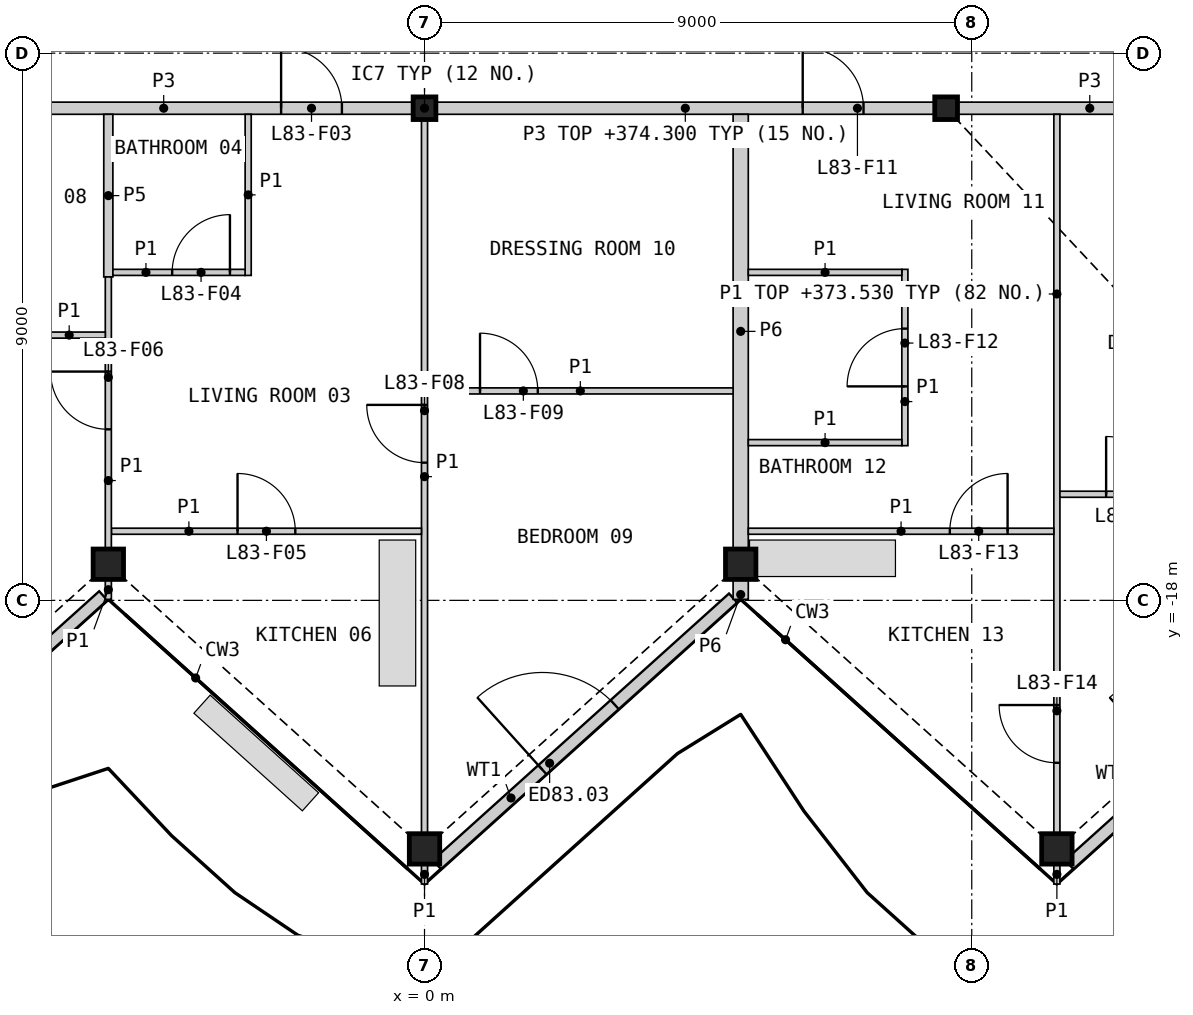
"""IFC4 building model, lengths in metres.
Left out: names, types, materials, properties, quantities, classifications, styles, units other than length and angle.
Written with IfcOpenShell. Run it as: python <this file> out.ifc"""

import sys

from ifc_helpers import new_model, si_unit, direction, frame, frame_2d, origin, origin_2d, place, context, subcontext, project, spatial, rectangle, hollow_rectangle, i_section, extrude, element, fill, save


model = new_model("IFC4")
c1 = context("Model", 3, precision=1e-05, world=origin(), true_north=direction((0.0, 1.0)))
c2 = subcontext(c1, "Body", "Model", "MODEL_VIEW")
j1 = project(units=[si_unit("LENGTHUNIT", "METRE"), si_unit("PLANEANGLEUNIT", "RADIAN")], contexts=[c1])
p1 = place(None, origin())
s1 = spatial("IfcSite", under=j1, at=p1, CompositionType="ELEMENT")
p2 = place(p1, origin())
s2 = spatial("IfcBuilding", under=s1, at=p2, CompositionType="ELEMENT")
p3 = place(p2, frame((0.0, 0.0, 371.2)))
s3 = spatial("IfcBuildingStorey", under=s2, at=p3, CompositionType="ELEMENT", Elevation=371.2)
for number, where, z_axis, x_axis in (
    (1, (-5.2, -17.406, 0.0), (0.0, 0.0, 1.0), (1.0, 0.0, 0.0)),
    (2, (0.0, -22.088, 0.0), (0.0, 0.0, 1.0), (1.0, 0.0, 0.0)),
    (3, (5.2, -17.406, 0.0), (0.0, 0.0, 1.0), (1.0, 0.0, 0.0)),
    (4, (10.4, -22.088, 0.0), (0.0, 0.0, 1.0), (1.0, 0.0, 0.0)),
):
    element("IfcColumn", number, at=place(p3, frame(where, z_axis=z_axis, x_axis=x_axis)), inside=s3, PredefinedType="COLUMN", context=c2, shape_type="SweptSolid", body=[
        extrude(hollow_rectangle(XDim=0.5, YDim=0.5, WallThickness=0.03, at=origin_2d()), origin(), (0.0, 0.0, 1.0), 3.4),
    ])
for number, where, z_axis, x_axis in (
    (5, (0.0, -9.906, 0.0), (0.0, 0.0, 1.0), (1.0, 0.0, 0.0)),
    (6, (8.578, -9.906, 0.0), (0.0, 0.0, 1.0), (1.0, 0.0, 0.0)),
):
    element("IfcColumn", number, at=place(p3, frame(where, z_axis=z_axis, x_axis=x_axis)), inside=s3, PredefinedType="COLUMN", context=c2, shape_type="SweptSolid", body=[
        extrude(i_section(OverallWidth=0.374, OverallDepth=0.372, WebThickness=0.016, FlangeThickness=0.026, at=origin_2d()), origin(), (0.0, 0.0, 1.0), 3.4),
    ])
p4 = place(p3, frame((-10.195, -22.346, 0.0), z_axis=(0.0, 0.0, 1.0), x_axis=(0.74313432117, 0.66914227239, 0.0)))
e7 = element("IfcWall", 7, at=p4, inside=s3, PredefinedType="SOLIDWALL", context=c2, shape_type="SweptSolid", body=[
    extrude(rectangle(XDim=6.609, YDim=0.2, at=frame_2d((3.304, 0.0))), origin(), (0.0, 0.0, 1.0), 2.634),
])
p5 = place(p4, frame((2.333, 0.0, 0.0)))
e8 = element("IfcOpeningElement", 8, at=p5, cuts=e7, PredefinedType="OPENING", context=c2, shape_type="SweptSolid", body=[
    extrude(rectangle(XDim=1.6, YDim=2.25, at=frame_2d((0.8, 1.125))), frame((0.0, 0.11, 0.0), z_axis=(0.0, -1.0, 0.0), x_axis=(1.0, 0.0, 0.0)), (0.0, 0.0, 1.0), 0.22),
])
p6 = place(p3, frame((0.205, -22.346, 0.0), z_axis=(0.0, 0.0, 1.0), x_axis=(0.74313295916, 0.669143785004, 0.0)))
e9 = element("IfcWall", 9, at=p6, inside=s3, PredefinedType="SOLIDWALL", context=c2, shape_type="SweptSolid", body=[
    extrude(rectangle(XDim=6.553, YDim=0.2, at=frame_2d((3.277, 0.0))), origin(), (0.0, 0.0, 1.0), 2.634),
])
p7 = place(p6, frame((2.333, 0.0, 0.0)))
e10 = element("IfcOpeningElement", 10, at=p7, cuts=e9, PredefinedType="OPENING", context=c2, shape_type="SweptSolid", body=[
    extrude(rectangle(XDim=1.6, YDim=2.25, at=frame_2d((0.8, 1.125))), frame((0.0, 0.11, 0.0), z_axis=(0.0, -1.0, 0.0), x_axis=(1.0, 0.0, 0.0)), (0.0, 0.0, 1.0), 0.22),
])
p8 = place(p3, frame((10.605, -22.346, 0.0), z_axis=(0.0, 0.0, 1.0), x_axis=(0.743137181878, 0.669139095339, 0.0)))
e11 = element("IfcWall", 11, at=p8, inside=s3, PredefinedType="SOLIDWALL", context=c2, shape_type="SweptSolid", body=[
    extrude(rectangle(XDim=6.265, YDim=0.2, at=frame_2d((3.133, 0.0))), origin(), (0.0, 0.0, 1.0), 2.634),
])
p9 = place(p8, frame((2.333, 0.0, 0.0)))
e12 = element("IfcOpeningElement", 12, at=p9, cuts=e11, PredefinedType="OPENING", context=c2, shape_type="SweptSolid", body=[
    extrude(rectangle(XDim=1.6, YDim=2.25, at=frame_2d((0.8, 1.125))), frame((0.0, 0.11, 0.0), z_axis=(0.0, -1.0, 0.0), x_axis=(1.0, 0.0, 0.0)), (0.0, 0.0, 1.0), 0.22),
])
p10 = place(p3, frame((0.197, -9.906, 0.0), z_axis=(0.0, 0.0, 1.0), x_axis=(1.0, 0.0, 0.0)))
e13 = element("IfcWall", 13, at=p10, inside=s3, PredefinedType="PARTITIONING", context=c2, shape_type="SweptSolid", body=[
    extrude(rectangle(XDim=8.185, YDim=0.2, at=frame_2d((4.092, 0.0))), origin(), (0.0, 0.0, 1.0), 3.1),
])
p11 = place(p10, frame((6.023, 0.0, 0.0)))
e14 = element("IfcOpeningElement", 14, at=p11, cuts=e13, PredefinedType="OPENING", context=c2, shape_type="SweptSolid", body=[
    extrude(rectangle(XDim=1.0, YDim=2.1, at=frame_2d((0.5, 1.05))), frame((0.0, 0.11, 0.0), z_axis=(0.0, -1.0, 0.0), x_axis=(1.0, 0.0, 0.0)), (0.0, 0.0, 1.0), 0.22),
])
p12 = place(p3, frame((-8.382, -9.906, 0.0), z_axis=(0.0, 0.0, 1.0), x_axis=(1.0, 0.0, 0.0)))
e15 = element("IfcWall", 15, at=p12, inside=s3, PredefinedType="PARTITIONING", context=c2, shape_type="SweptSolid", body=[
    extrude(rectangle(XDim=8.185, YDim=0.2, at=frame_2d((4.092, 0.0))), origin(), (0.0, 0.0, 1.0), 3.1),
])
p13 = place(p12, frame((6.023, 0.0, 0.0)))
e16 = element("IfcOpeningElement", 16, at=p13, cuts=e15, PredefinedType="OPENING", context=c2, shape_type="SweptSolid", body=[
    extrude(rectangle(XDim=1.0, YDim=2.1, at=frame_2d((0.5, 1.05))), frame((0.0, 0.11, 0.0), z_axis=(0.0, -1.0, 0.0), x_axis=(1.0, 0.0, 0.0)), (0.0, 0.0, 1.0), 0.22),
])
p14 = place(p3, frame((5.2, -17.146, 0.0), z_axis=(0.0, 0.0, 1.0), x_axis=(0.0, 1.0, 0.0)))
e17 = element("IfcWall", 17, at=p14, inside=s3, PredefinedType="PARTITIONING", context=c2, shape_type="SweptSolid", body=[
    extrude(rectangle(XDim=7.14, YDim=0.25, at=frame_2d((3.57, 0.0))), origin(), (0.0, 0.0, 1.0), 2.33),
])
p15 = place(p3, frame((8.775, -9.906, 0.0), z_axis=(0.0, 0.0, 1.0), x_axis=(1.0, 0.0, 0.0)))
e18 = element("IfcWall", 18, at=p15, inside=s3, PredefinedType="PARTITIONING", context=c2, shape_type="SweptSolid", body=[
    extrude(rectangle(XDim=4.331, YDim=0.2, at=frame_2d((2.165, 0.0))), origin(), (0.0, 0.0, 1.0), 3.1),
])
p16 = place(p3, frame((5.2, -17.983, 0.0), z_axis=(0.0, 0.0, 1.0), x_axis=(0.0, 1.0, 0.0)))
e19 = element("IfcWall", 19, at=p16, inside=s3, PredefinedType="PARTITIONING", context=c2, shape_type="SweptSolid", body=[
    extrude(rectangle(XDim=0.318, YDim=0.25, at=frame_2d((0.159, 0.0))), origin(), (0.0, 0.0, 1.0), 2.33),
])
p17 = place(p3, frame((-5.2, -12.681, 0.0), z_axis=(0.0, 0.0, 1.0), x_axis=(0.0, 1.0, 0.0)))
e20 = element("IfcWall", 20, at=p17, inside=s3, PredefinedType="PLUMBINGWALL", context=c2, shape_type="SweptSolid", body=[
    extrude(rectangle(XDim=2.675, YDim=0.15, at=frame_2d((1.337, 0.0))), origin(), (0.0, 0.0, 1.0), 2.33),
])
p18 = place(p3, frame((10.4, -21.828, 0.0), z_axis=(0.0, 0.0, 1.0), x_axis=(0.0, 1.0, 0.0)))
e21 = element("IfcWall", 21, at=p18, inside=s3, PredefinedType="PARTITIONING", context=c2, shape_type="SweptSolid", body=[
    extrude(rectangle(XDim=11.822, YDim=0.1, at=frame_2d((5.911, 0.0))), origin(), (0.0, 0.0, 1.0), 2.33),
])
p19 = place(p18, frame((1.156, 0.0, 0.0)))
e22 = element("IfcOpeningElement", 22, at=p19, cuts=e21, PredefinedType="OPENING", context=c2, shape_type="SweptSolid", body=[
    extrude(rectangle(XDim=0.95, YDim=2.1, at=frame_2d((0.475, 1.05))), frame((0.0, 0.06, 0.0), z_axis=(0.0, -1.0, 0.0), x_axis=(1.0, 0.0, 0.0)), (0.0, 0.0, 1.0), 0.12),
])
p20 = place(p3, frame((0.0, -21.828, 0.0), z_axis=(0.0, 0.0, 1.0), x_axis=(0.0, 1.0, 0.0)))
e23 = element("IfcWall", 23, at=p20, inside=s3, PredefinedType="PARTITIONING", context=c2, shape_type="SweptSolid", body=[
    extrude(rectangle(XDim=11.725, YDim=0.1, at=frame_2d((5.863, 0.0))), origin(), (0.0, 0.0, 1.0), 2.33),
])
p21 = place(p20, frame((6.093, 0.0, 0.0)))
e24 = element("IfcOpeningElement", 24, at=p21, cuts=e23, PredefinedType="OPENING", context=c2, shape_type="SweptSolid", body=[
    extrude(rectangle(XDim=0.95, YDim=2.1, at=frame_2d((0.475, 1.05))), frame((0.0, 0.06, 0.0), z_axis=(0.0, -1.0, 0.0), x_axis=(1.0, 0.0, 0.0)), (0.0, 0.0, 1.0), 0.12),
])
p22 = place(p3, frame((10.45, -16.255, 0.0), z_axis=(0.0, 0.0, 1.0), x_axis=(1.0, 0.0, 0.0)))
e25 = element("IfcWall", 25, at=p22, inside=s3, PredefinedType="PARTITIONING", context=c2, shape_type="SweptSolid", body=[
    extrude(rectangle(XDim=6.447, YDim=0.1, at=frame_2d((3.223, 0.0))), origin(), (0.0, 0.0, 1.0), 2.33),
])
p23 = place(p22, frame((0.76, 0.0, 0.0)))
e26 = element("IfcOpeningElement", 26, at=p23, cuts=e25, PredefinedType="OPENING", context=c2, shape_type="SweptSolid", body=[
    extrude(rectangle(XDim=0.95, YDim=2.1, at=frame_2d((0.475, 1.05))), frame((0.0, 0.06, 0.0), z_axis=(0.0, -1.0, 0.0), x_axis=(1.0, 0.0, 0.0)), (0.0, 0.0, 1.0), 0.12),
])
p24 = place(p3, frame((-5.15, -16.863, 0.0), z_axis=(0.0, 0.0, 1.0), x_axis=(1.0, 0.0, 0.0)))
e27 = element("IfcWall", 27, at=p24, inside=s3, PredefinedType="PARTITIONING", context=c2, shape_type="SweptSolid", body=[
    extrude(rectangle(XDim=5.1, YDim=0.1, at=frame_2d((2.55, 0.0))), origin(), (0.0, 0.0, 1.0), 2.33),
])
p25 = place(p24, frame((2.075, 0.0, 0.0)))
e28 = element("IfcOpeningElement", 28, at=p25, cuts=e27, PredefinedType="OPENING", context=c2, shape_type="SweptSolid", body=[
    extrude(rectangle(XDim=0.95, YDim=2.1, at=frame_2d((0.475, 1.05))), frame((0.0, 0.06, 0.0), z_axis=(0.0, -1.0, 0.0), x_axis=(1.0, 0.0, 0.0)), (0.0, 0.0, 1.0), 0.12),
])
p26 = place(p3, frame((5.325, -16.863, 0.0), z_axis=(0.0, 0.0, 1.0), x_axis=(1.0, 0.0, 0.0)))
e29 = element("IfcWall", 29, at=p26, inside=s3, PredefinedType="PARTITIONING", context=c2, shape_type="SweptSolid", body=[
    extrude(rectangle(XDim=5.025, YDim=0.1, at=frame_2d((2.513, 0.0))), origin(), (0.0, 0.0, 1.0), 2.33),
])
p27 = place(p26, frame((3.314, 0.0, 0.0)))
e30 = element("IfcOpeningElement", 30, at=p27, cuts=e29, PredefinedType="OPENING", context=c2, shape_type="SweptSolid", body=[
    extrude(rectangle(XDim=0.95, YDim=2.1, at=frame_2d((0.475, 1.05))), frame((0.0, 0.06, 0.0), z_axis=(0.0, -1.0, 0.0), x_axis=(1.0, 0.0, 0.0)), (0.0, 0.0, 1.0), 0.12),
])
p28 = place(p3, frame((0.05, -14.555, 0.0), z_axis=(0.0, 0.0, 1.0), x_axis=(1.0, 0.0, 0.0)))
e31 = element("IfcWall", 31, at=p28, inside=s3, PredefinedType="PARTITIONING", context=c2, shape_type="SweptSolid", body=[
    extrude(rectangle(XDim=5.025, YDim=0.1, at=frame_2d((2.512, 0.0))), origin(), (0.0, 0.0, 1.0), 2.33),
])
p29 = place(p28, frame((0.863, 0.0, 0.0)))
e32 = element("IfcOpeningElement", 32, at=p29, cuts=e31, PredefinedType="OPENING", context=c2, shape_type="SweptSolid", body=[
    extrude(rectangle(XDim=0.95, YDim=2.1, at=frame_2d((0.475, 1.05))), frame((0.0, 0.06, 0.0), z_axis=(0.0, -1.0, 0.0), x_axis=(1.0, 0.0, 0.0)), (0.0, 0.0, 1.0), 0.12),
])
p30 = place(p3, frame((-5.2, -17.146, 0.0), z_axis=(0.0, 0.0, 1.0), x_axis=(0.0, 1.0, 0.0)))
e33 = element("IfcWall", 33, at=p30, inside=s3, PredefinedType="PARTITIONING", context=c2, shape_type="SweptSolid", body=[
    extrude(rectangle(XDim=4.465, YDim=0.1, at=frame_2d((2.232, 0.0))), origin(), (0.0, 0.0, 1.0), 2.33),
])
p31 = place(p30, frame((1.958, 0.0, 0.0)))
e34 = element("IfcOpeningElement", 34, at=p31, cuts=e33, PredefinedType="OPENING", context=c2, shape_type="SweptSolid", body=[
    extrude(rectangle(XDim=0.95, YDim=2.1, at=frame_2d((0.475, 1.05))), frame((0.0, 0.06, 0.0), z_axis=(0.0, -1.0, 0.0), x_axis=(1.0, 0.0, 0.0)), (0.0, 0.0, 1.0), 0.12),
])
p32 = place(p3, frame((7.9, -15.456, 0.0), z_axis=(0.0, 0.0, 1.0), x_axis=(0.0, 1.0, 0.0)))
e35 = element("IfcWall", 35, at=p32, inside=s3, PredefinedType="PARTITIONING", context=c2, shape_type="SweptSolid", body=[
    extrude(rectangle(XDim=2.9, YDim=0.1, at=frame_2d((1.45, 0.0))), origin(), (0.0, 0.0, 1.0), 2.33),
])
p33 = place(p32, frame((0.975, 0.0, 0.0)))
e36 = element("IfcOpeningElement", 36, at=p33, cuts=e35, PredefinedType="OPENING", context=c2, shape_type="SweptSolid", body=[
    extrude(rectangle(XDim=0.95, YDim=2.1, at=frame_2d((0.475, 1.05))), frame((0.0, 0.06, 0.0), z_axis=(0.0, -1.0, 0.0), x_axis=(1.0, 0.0, 0.0)), (0.0, 0.0, 1.0), 0.12),
])
p34 = place(p3, frame((-2.9, -12.656, 0.0), z_axis=(0.0, 0.0, 1.0), x_axis=(0.0, 1.0, 0.0)))
e37 = element("IfcWall", 37, at=p34, inside=s3, PredefinedType="PARTITIONING", context=c2, shape_type="SweptSolid", body=[
    extrude(rectangle(XDim=2.65, YDim=0.1, at=frame_2d((1.325, 0.0))), origin(), (0.0, 0.0, 1.0), 2.33),
])
for number, where, z_axis, x_axis in (
    (38, (5.325, -12.606, 0.0), (0.0, 0.0, 1.0), (1.0, 0.0, 0.0)),
    (39, (5.325, -15.406, 0.0), (0.0, 0.0, 1.0), (1.0, 0.0, 0.0)),
):
    element("IfcWall", number, at=place(p3, frame(where, z_axis=z_axis, x_axis=x_axis)), inside=s3, PredefinedType="PARTITIONING", context=c2, shape_type="SweptSolid", body=[
        extrude(rectangle(XDim=2.525, YDim=0.1, at=frame_2d((1.263, 0.0))), origin(), (0.0, 0.0, 1.0), 2.33),
    ])
p35 = place(p3, frame((-7.625, -13.637, 0.0), z_axis=(0.0, 0.0, 1.0), x_axis=(1.0, 0.0, 0.0)))
e40 = element("IfcWall", 40, at=p35, inside=s3, PredefinedType="PARTITIONING", context=c2, shape_type="SweptSolid", body=[
    extrude(rectangle(XDim=2.375, YDim=0.1, at=frame_2d((1.188, 0.0))), origin(), (0.0, 0.0, 1.0), 2.33),
])
p36 = place(p35, frame((0.25, 0.0, 0.0)))
e41 = element("IfcOpeningElement", 41, at=p36, cuts=e40, PredefinedType="OPENING", context=c2, shape_type="SweptSolid", body=[
    extrude(rectangle(XDim=0.95, YDim=2.1, at=frame_2d((0.475, 1.05))), frame((0.0, 0.06, 0.0), z_axis=(0.0, -1.0, 0.0), x_axis=(1.0, 0.0, 0.0)), (0.0, 0.0, 1.0), 0.12),
])
p37 = place(p3, frame((-5.125, -12.606, 0.0), z_axis=(0.0, 0.0, 1.0), x_axis=(1.0, 0.0, 0.0)))
e42 = element("IfcWall", 42, at=p37, inside=s3, PredefinedType="PARTITIONING", context=c2, shape_type="SweptSolid", body=[
    extrude(rectangle(XDim=2.175, YDim=0.1, at=frame_2d((1.087, 0.0))), origin(), (0.0, 0.0, 1.0), 2.33),
])
p38 = place(p37, frame((0.975, 0.0, 0.0)))
e43 = element("IfcOpeningElement", 43, at=p38, cuts=e42, PredefinedType="OPENING", context=c2, shape_type="SweptSolid", body=[
    extrude(rectangle(XDim=0.95, YDim=2.1, at=frame_2d((0.475, 1.05))), frame((0.0, 0.06, 0.0), z_axis=(0.0, -1.0, 0.0), x_axis=(1.0, 0.0, 0.0)), (0.0, 0.0, 1.0), 0.12),
])
for number, where, z_axis, x_axis in (
    (44, (-5.2, -17.983, 0.0), (0.0, 0.0, 1.0), (0.0, 1.0, 0.0)),
    (45, (0.0, -22.666, 0.0), (0.0, 0.0, 1.0), (0.0, 1.0, 0.0)),
    (46, (10.4, -22.666, 0.0), (0.0, 0.0, 1.0), (0.0, 1.0, 0.0)),
):
    element("IfcWall", number, at=place(p3, frame(where, z_axis=z_axis, x_axis=x_axis)), inside=s3, PredefinedType="PARTITIONING", context=c2, shape_type="SweptSolid", body=[
        extrude(rectangle(XDim=0.318, YDim=0.1, at=frame_2d((0.159, 0.0))), origin(), (0.0, 0.0, 1.0), 2.33),
    ])
p39 = place(p7, origin())
e47 = element("IfcDoor", 47, at=p39, inside=s3, OperationType="DOUBLE_DOOR_SINGLE_SWING", PredefinedType="DOOR", context=c2, shape_type="SweptSolid", body=[
    extrude(rectangle(XDim=1.6, YDim=2.25, at=frame_2d((0.8, 1.125))), frame((0.0, 0.025, 0.0), z_axis=(0.0, -1.0, 0.0), x_axis=(1.0, 0.0, 0.0)), (0.0, 0.0, 1.0), 0.05),
])
fill(e10, e47)
p40 = place(p13, origin())
e48 = element("IfcDoor", 48, at=p40, inside=s3, OperationType="SINGLE_SWING_LEFT", PredefinedType="DOOR", context=c2, shape_type="SweptSolid", body=[
    extrude(rectangle(XDim=1.0, YDim=2.1, at=frame_2d((0.5, 1.05))), frame((0.0, 0.025, 0.0), z_axis=(0.0, -1.0, 0.0), x_axis=(1.0, 0.0, 0.0)), (0.0, 0.0, 1.0), 0.05),
])
fill(e16, e48)
p41 = place(p38, origin())
e49 = element("IfcDoor", 49, at=p41, inside=s3, OperationType="SINGLE_SWING_RIGHT", PredefinedType="DOOR", context=c2, shape_type="SweptSolid", body=[
    extrude(rectangle(XDim=0.95, YDim=2.1, at=frame_2d((0.475, 1.05))), frame((0.0, 0.025, 0.0), z_axis=(0.0, -1.0, 0.0), x_axis=(1.0, 0.0, 0.0)), (0.0, 0.0, 1.0), 0.05),
])
fill(e43, e49)
p42 = place(p25, origin())
e50 = element("IfcDoor", 50, at=p42, inside=s3, OperationType="SINGLE_SWING_LEFT", PredefinedType="DOOR", context=c2, shape_type="SweptSolid", body=[
    extrude(rectangle(XDim=0.95, YDim=2.1, at=frame_2d((0.475, 1.05))), frame((0.0, 0.025, 0.0), z_axis=(0.0, -1.0, 0.0), x_axis=(1.0, 0.0, 0.0)), (0.0, 0.0, 1.0), 0.05),
])
fill(e28, e50)
p43 = place(p31, origin())
e51 = element("IfcDoor", 51, at=p43, inside=s3, OperationType="SINGLE_SWING_RIGHT", PredefinedType="DOOR", context=c2, shape_type="SweptSolid", body=[
    extrude(rectangle(XDim=0.95, YDim=2.1, at=frame_2d((0.475, 1.05))), frame((0.0, 0.025, 0.0), z_axis=(0.0, -1.0, 0.0), x_axis=(1.0, 0.0, 0.0)), (0.0, 0.0, 1.0), 0.05),
])
fill(e34, e51)
p44 = place(p21, origin())
e52 = element("IfcDoor", 52, at=p44, inside=s3, OperationType="SINGLE_SWING_RIGHT", PredefinedType="DOOR", context=c2, shape_type="SweptSolid", body=[
    extrude(rectangle(XDim=0.95, YDim=2.1, at=frame_2d((0.475, 1.05))), frame((0.0, 0.025, 0.0), z_axis=(0.0, -1.0, 0.0), x_axis=(1.0, 0.0, 0.0)), (0.0, 0.0, 1.0), 0.05),
])
fill(e24, e52)
p45 = place(p29, origin())
e53 = element("IfcDoor", 53, at=p45, inside=s3, OperationType="SINGLE_SWING_LEFT", PredefinedType="DOOR", context=c2, shape_type="SweptSolid", body=[
    extrude(rectangle(XDim=0.95, YDim=2.1, at=frame_2d((0.475, 1.05))), frame((0.0, 0.025, 0.0), z_axis=(0.0, -1.0, 0.0), x_axis=(1.0, 0.0, 0.0)), (0.0, 0.0, 1.0), 0.05),
])
fill(e32, e53)
p46 = place(p11, origin())
e54 = element("IfcDoor", 54, at=p46, inside=s3, OperationType="SINGLE_SWING_LEFT", PredefinedType="DOOR", context=c2, shape_type="SweptSolid", body=[
    extrude(rectangle(XDim=1.0, YDim=2.1, at=frame_2d((0.5, 1.05))), frame((0.0, 0.025, 0.0), z_axis=(0.0, -1.0, 0.0), x_axis=(1.0, 0.0, 0.0)), (0.0, 0.0, 1.0), 0.05),
])
fill(e14, e54)
p47 = place(p33, origin())
e55 = element("IfcDoor", 55, at=p47, inside=s3, OperationType="SINGLE_SWING_LEFT", PredefinedType="DOOR", context=c2, shape_type="SweptSolid", body=[
    extrude(rectangle(XDim=0.95, YDim=2.1, at=frame_2d((0.475, 1.05))), frame((0.0, 0.025, 0.0), z_axis=(0.0, -1.0, 0.0), x_axis=(1.0, 0.0, 0.0)), (0.0, 0.0, 1.0), 0.05),
])
fill(e36, e55)
p48 = place(p27, origin())
e56 = element("IfcDoor", 56, at=p48, inside=s3, OperationType="SINGLE_SWING_RIGHT", PredefinedType="DOOR", context=c2, shape_type="SweptSolid", body=[
    extrude(rectangle(XDim=0.95, YDim=2.1, at=frame_2d((0.475, 1.05))), frame((0.0, 0.025, 0.0), z_axis=(0.0, -1.0, 0.0), x_axis=(1.0, 0.0, 0.0)), (0.0, 0.0, 1.0), 0.05),
])
fill(e30, e56)
p49 = place(p19, origin())
e57 = element("IfcDoor", 57, at=p49, inside=s3, OperationType="SINGLE_SWING_RIGHT", PredefinedType="DOOR", context=c2, shape_type="SweptSolid", body=[
    extrude(rectangle(XDim=0.95, YDim=2.1, at=frame_2d((0.475, 1.05))), frame((0.0, 0.025, 0.0), z_axis=(0.0, -1.0, 0.0), x_axis=(1.0, 0.0, 0.0)), (0.0, 0.0, 1.0), 0.05),
])
fill(e22, e57)
p50 = place(p23, origin())
e58 = element("IfcDoor", 58, at=p50, inside=s3, OperationType="SINGLE_SWING_LEFT", PredefinedType="DOOR", context=c2, shape_type="SweptSolid", body=[
    extrude(rectangle(XDim=0.95, YDim=2.1, at=frame_2d((0.475, 1.05))), frame((0.0, 0.025, 0.0), z_axis=(0.0, -1.0, 0.0), x_axis=(1.0, 0.0, 0.0)), (0.0, 0.0, 1.0), 0.05),
])
fill(e26, e58)
save(model, sys.argv[1])
